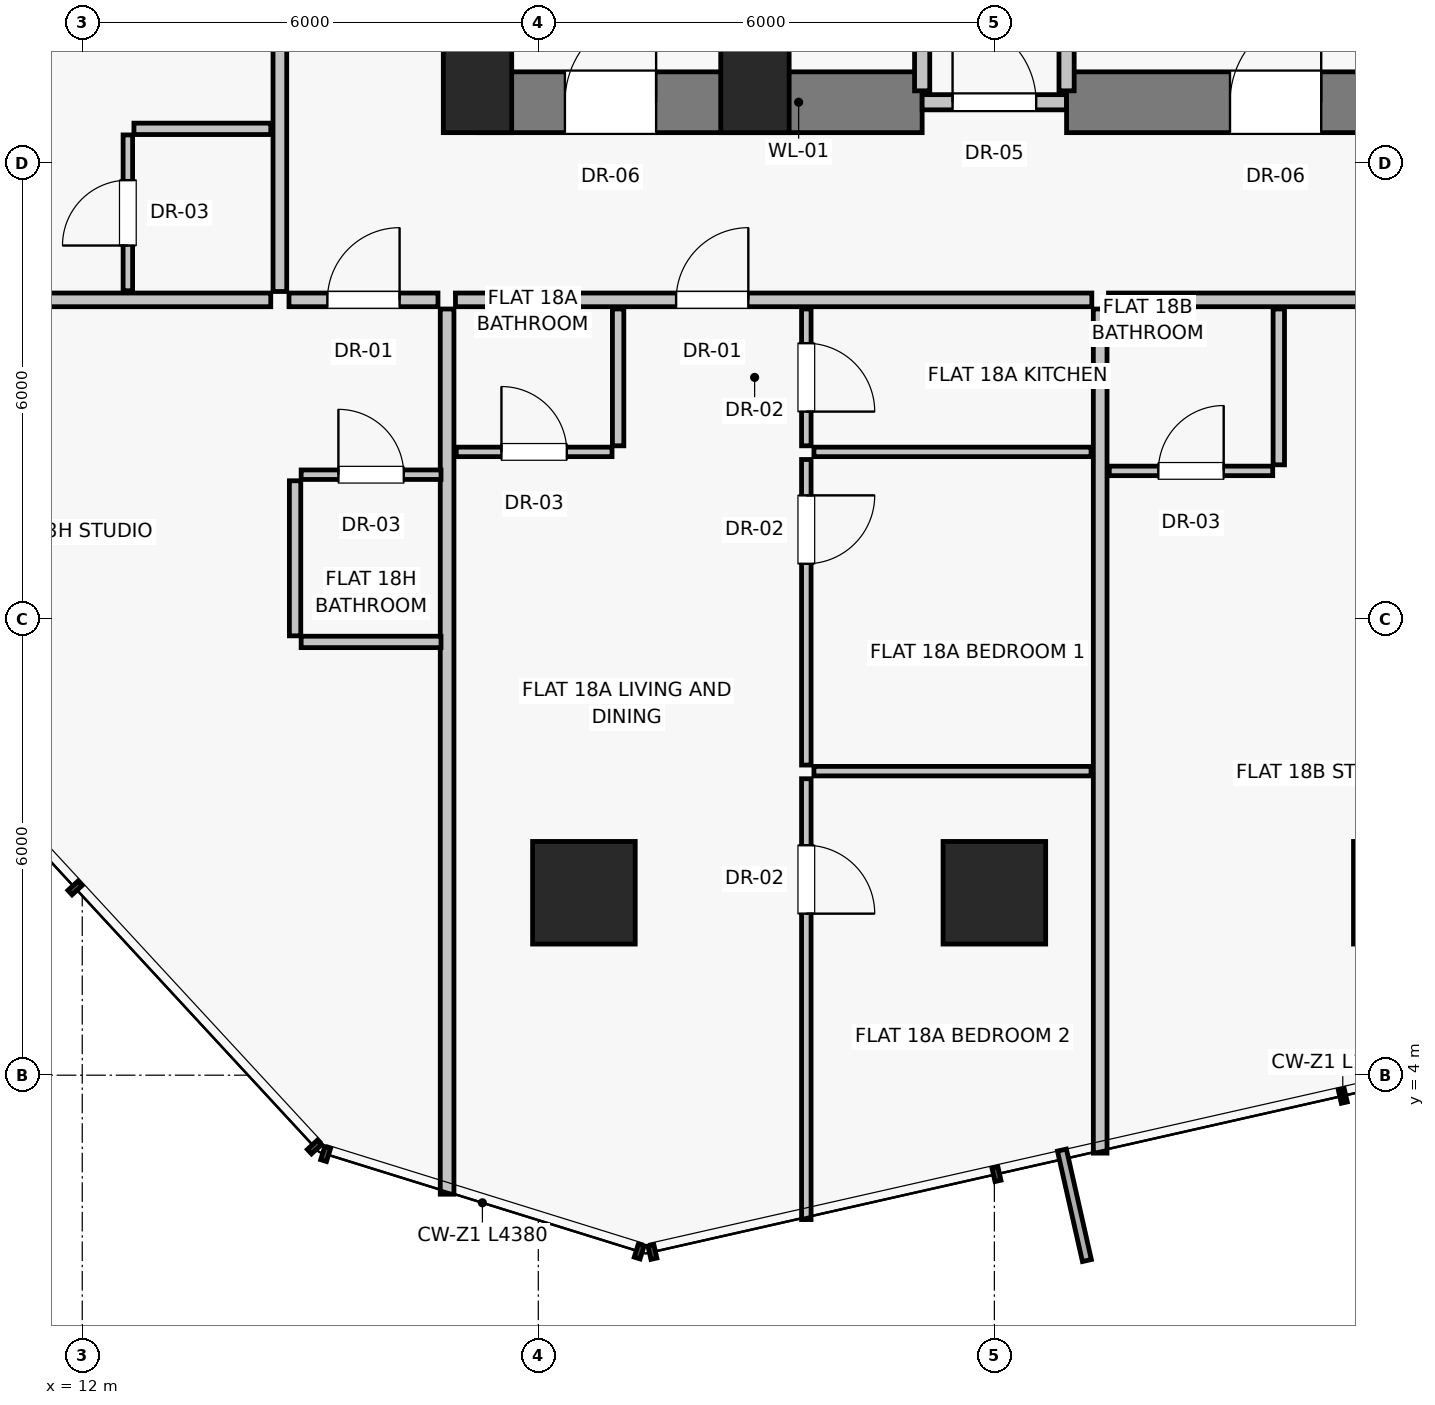
"""IFC4 building model, lengths in metres.
Left out: names, types, materials, properties, quantities, classifications, styles, units other than length and angle.
Written with IfcOpenShell. Run it as: python <this file> out.ifc"""

import sys

from ifc_helpers import new_model, si_unit, direction, frame, frame_2d, origin, origin_2d, place, context, subcontext, project, spatial, rectangle, extrude, source, transform, mapped, element, fill, save


model = new_model("IFC4")
c1 = context("Model", 3, precision=1e-05, world=origin(), true_north=direction((0.0, 1.0)))
c2 = subcontext(c1, "Body", "Model", "MODEL_VIEW")
j1 = project(units=[si_unit("LENGTHUNIT", "METRE"), si_unit("PLANEANGLEUNIT", "RADIAN")], contexts=[c1])
p1 = place(None, origin())
s1 = spatial("IfcSite", under=j1, at=p1, CompositionType="ELEMENT")
p2 = place(p1, origin())
s2 = spatial("IfcBuilding", under=s1, at=p2, CompositionType="ELEMENT")
p3 = place(p2, frame((0.0, 0.0, 67.35)))
s3 = spatial("IfcBuildingStorey", under=s2, at=p3, CompositionType="ELEMENT", Elevation=67.35)
for number, where, z_axis, x_axis in (
    (1, (17.2, 17.0, 0.0), (0.0, 0.0, 1.0), (1.0, 0.0, 0.0)),
    (2, (20.85, 17.0, 0.0), (0.0, 0.0, 1.0), (1.0, 0.0, 0.0)),
):
    element("IfcColumn", number, at=place(p3, frame(where, z_axis=z_axis, x_axis=x_axis)), inside=s3, PredefinedType="PILASTER", context=c2, shape_type="SweptSolid", body=[
        extrude(rectangle(XDim=0.9, YDim=1.2, at=origin_2d()), origin(), (0.0, 0.0, 1.0), 3.25),
    ])
for number, where, z_axis, x_axis in (
    (3, (18.6, 6.4, 0.0), (0.0, 0.0, 1.0), (1.0, 0.0, 0.0)),
    (4, (24.0, 6.4, 0.0), (0.0, 0.0, 1.0), (1.0, 0.0, 0.0)),
    (5, (29.4, 6.4, 0.0), (0.0, 0.0, 1.0), (1.0, 0.0, 0.0)),
):
    element("IfcColumn", number, at=place(p3, frame(where, z_axis=z_axis, x_axis=x_axis)), inside=s3, PredefinedType="COLUMN", context=c2, shape_type="SweptSolid", body=[
        extrude(rectangle(XDim=1.35, YDim=1.35, at=origin_2d()), origin(), (0.0, 0.0, 1.0), 3.25),
    ])
p4 = place(p3, frame((17.2, 16.8, 0.0), z_axis=(0.0, 0.0, 1.0), x_axis=(0.0, 1.0, 0.0)))
e6 = element("IfcWall", 6, at=p4, inside=s3, PredefinedType="SHEAR", context=c2, shape_type="SweptSolid", body=[
    extrude(rectangle(XDim=14.2, YDim=0.8, at=frame_2d((7.1, 0.0))), origin(), (0.0, 0.0, 1.0), 3.0),
])
p5 = place(p3, frame((17.2, 16.8, 0.0), z_axis=(0.0, 0.0, 1.0), x_axis=(1.0, 0.0, 0.0)))
e7 = element("IfcWall", 7, at=p5, inside=s3, PredefinedType="SHEAR", context=c2, shape_type="SweptSolid", body=[
    extrude(rectangle(XDim=5.85, YDim=0.8, at=frame_2d((2.925, 0.0))), origin(), (0.0, 0.0, 1.0), 3.0),
])
p6 = place(p5, frame((1.15, 0.0, 0.0)))
e8 = element("IfcOpeningElement", 8, at=p6, cuts=e7, PredefinedType="OPENING", context=c2, shape_type="SweptSolid", body=[
    extrude(rectangle(XDim=1.2, YDim=2.03, at=frame_2d((0.6, 1.015))), frame((0.0, 0.41, 0.0), z_axis=(0.0, -1.0, 0.0), x_axis=(1.0, 0.0, 0.0)), (0.0, 0.0, 1.0), 0.82),
])
p7 = place(p3, frame((23.05, 16.8, 0.0), z_axis=(0.0, 0.0, 1.0), x_axis=(1.0, 0.0, 0.0)))
e9 = element("IfcWall", 9, at=p7, inside=s3, PredefinedType="SOLIDWALL", context=c2, shape_type="SweptSolid", body=[
    extrude(rectangle(XDim=1.9, YDim=0.2, at=frame_2d((0.95, 0.0))), origin(), (0.0, 0.0, 1.0), 2.15),
])
p8 = place(p7, frame((0.4, 0.0, 0.0)))
e10 = element("IfcOpeningElement", 10, at=p8, cuts=e9, PredefinedType="OPENING", context=c2, shape_type="SweptSolid", body=[
    extrude(rectangle(XDim=1.1, YDim=2.03, at=frame_2d((0.55, 1.015))), frame((0.0, 0.11, 0.0), z_axis=(0.0, -1.0, 0.0), x_axis=(1.0, 0.0, 0.0)), (0.0, 0.0, 1.0), 0.22),
])
p9 = place(p3, frame((24.95, 16.8, 0.0), z_axis=(0.0, 0.0, 1.0), x_axis=(1.0, 0.0, 0.0)))
e11 = element("IfcWall", 11, at=p9, inside=s3, PredefinedType="SHEAR", context=c2, shape_type="SweptSolid", body=[
    extrude(rectangle(XDim=5.85, YDim=0.8, at=frame_2d((2.925, 0.0))), origin(), (0.0, 0.0, 1.0), 3.0),
])
p10 = place(p9, frame((2.15, 0.0, 0.0)))
e12 = element("IfcOpeningElement", 12, at=p10, cuts=e11, PredefinedType="OPENING", context=c2, shape_type="SweptSolid", body=[
    extrude(rectangle(XDim=1.2, YDim=2.03, at=frame_2d((0.6, 1.015))), frame((0.0, 0.41, 0.0), z_axis=(0.0, -1.0, 0.0), x_axis=(1.0, 0.0, 0.0)), (0.0, 0.0, 1.0), 0.82),
])
for number, where, z_axis, x_axis in (
    (13, (23.05, 16.95, 0.0), (0.0, 0.0, 1.0), (0.0, 1.0, 0.0)),
    (14, (24.95, 16.95, 0.0), (0.0, 0.0, 1.0), (0.0, 1.0, 0.0)),
):
    element("IfcWall", number, at=place(p3, frame(where, z_axis=z_axis, x_axis=x_axis)), inside=s3, PredefinedType="SOLIDWALL", context=c2, shape_type="SweptSolid", body=[
        extrude(rectangle(XDim=5.6, YDim=0.2, at=frame_2d((2.8, 0.0))), origin(), (0.0, 0.0, 1.0), 3.0),
    ])
p11 = place(p3, frame((16.8, 14.08, 0.0), z_axis=(0.0, 0.0, 1.0), x_axis=(0.0, -1.0, 0.0)))
e15 = element("IfcWall", 15, at=p11, inside=s3, PredefinedType="PARTITIONING", context=c2, shape_type="SweptSolid", body=[
    extrude(rectangle(XDim=11.646, YDim=0.18, at=frame_2d((5.823, 0.0))), origin(), (0.0, 0.0, 1.0), 3.0),
])
p12 = place(p3, frame((16.91, 14.2, 0.0), z_axis=(0.0, 0.0, 1.0), x_axis=(1.0, 0.0, 0.0)))
e16 = element("IfcWall", 16, at=p12, inside=s3, PredefinedType="PARTITIONING", context=c2, shape_type="SweptSolid", body=[
    extrude(rectangle(XDim=8.372, YDim=0.18, at=frame_2d((4.186, 0.0))), origin(), (0.0, 0.0, 1.0), 3.0),
])
p13 = place(p12, frame((2.903, 0.0, 0.0)))
e17 = element("IfcOpeningElement", 17, at=p13, cuts=e16, PredefinedType="OPENING", context=c2, shape_type="SweptSolid", body=[
    extrude(rectangle(XDim=0.95, YDim=2.02, at=frame_2d((0.475, 1.01))), frame((0.0, 0.1, 0.0), z_axis=(0.0, -1.0, 0.0), x_axis=(1.0, 0.0, 0.0)), (0.0, 0.0, 1.0), 0.2),
])
p14 = place(p3, frame((19.05, 14.08, 0.0), z_axis=(0.0, 0.0, 1.0), x_axis=(0.0, -1.0, 0.0)))
e18 = element("IfcWall", 18, at=p14, inside=s3, PredefinedType="PARTITIONING", context=c2, shape_type="SweptSolid", body=[
    extrude(rectangle(XDim=1.8, YDim=0.15, at=frame_2d((0.9, 0.0))), origin(), (0.0, 0.0, 1.0), 3.0),
])
p15 = place(p3, frame((16.92, 12.2, 0.0), z_axis=(0.0, 0.0, 1.0), x_axis=(1.0, 0.0, 0.0)))
e19 = element("IfcWall", 19, at=p15, inside=s3, PredefinedType="PARTITIONING", context=c2, shape_type="SweptSolid", body=[
    extrude(rectangle(XDim=2.05, YDim=0.125, at=frame_2d((1.025, 0.0))), origin(), (0.0, 0.0, 1.0), 3.0),
])
p16 = place(p15, frame((0.595, 0.0, 0.0)))
e20 = element("IfcOpeningElement", 20, at=p16, cuts=e19, PredefinedType="OPENING", context=c2, shape_type="SweptSolid", body=[
    extrude(rectangle(XDim=0.86, YDim=2.01, at=frame_2d((0.43, 1.005))), frame((0.0, 0.073, 0.0), z_axis=(0.0, -1.0, 0.0), x_axis=(1.0, 0.0, 0.0)), (0.0, 0.0, 1.0), 0.145),
])
p17 = place(p3, frame((21.526, 14.08, 0.0), z_axis=(0.0, 0.0, 1.0), x_axis=(0.0, -1.0, 0.0)))
e21 = element("IfcWall", 21, at=p17, inside=s3, PredefinedType="PARTITIONING", context=c2, shape_type="SweptSolid", body=[
    extrude(rectangle(XDim=1.8, YDim=0.125, at=frame_2d((0.9, 0.0))), origin(), (0.0, 0.0, 1.0), 3.0),
])
p18 = place(p17, frame((0.45, 0.0, 0.0)))
e22 = element("IfcOpeningElement", 22, at=p18, cuts=e21, PredefinedType="OPENING", context=c2, shape_type="SweptSolid", body=[
    extrude(rectangle(XDim=0.9, YDim=2.01, at=frame_2d((0.45, 1.005))), frame((0.0, 0.073, 0.0), z_axis=(0.0, -1.0, 0.0), x_axis=(1.0, 0.0, 0.0)), (0.0, 0.0, 1.0), 0.145),
])
for number, where, z_axis, x_axis in (
    (23, (21.626, 12.2, 0.0), (0.0, 0.0, 1.0), (1.0, 0.0, 0.0)),
    (24, (21.626, 8.0, 0.0), (0.0, 0.0, 1.0), (1.0, 0.0, 0.0)),
):
    element("IfcWall", number, at=place(p3, frame(where, z_axis=z_axis, x_axis=x_axis)), inside=s3, PredefinedType="PARTITIONING", context=c2, shape_type="SweptSolid", body=[
        extrude(rectangle(XDim=3.646, YDim=0.125, at=frame_2d((1.823, 0.0))), origin(), (0.0, 0.0, 1.0), 3.0),
    ])
p19 = place(p3, frame((21.526, 12.1, 0.0), z_axis=(0.0, 0.0, 1.0), x_axis=(0.0, -1.0, 0.0)))
e25 = element("IfcWall", 25, at=p19, inside=s3, PredefinedType="PARTITIONING", context=c2, shape_type="SweptSolid", body=[
    extrude(rectangle(XDim=4.02, YDim=0.125, at=frame_2d((2.01, 0.0))), origin(), (0.0, 0.0, 1.0), 3.0),
])
p20 = place(p19, frame((0.472, 0.0, 0.0)))
e26 = element("IfcOpeningElement", 26, at=p20, cuts=e25, PredefinedType="OPENING", context=c2, shape_type="SweptSolid", body=[
    extrude(rectangle(XDim=0.9, YDim=2.01, at=frame_2d((0.45, 1.005))), frame((0.0, 0.073, 0.0), z_axis=(0.0, -1.0, 0.0), x_axis=(1.0, 0.0, 0.0)), (0.0, 0.0, 1.0), 0.145),
])
p21 = place(p3, frame((21.526, 7.9, 0.0), z_axis=(0.0, 0.0, 1.0), x_axis=(0.0, -1.0, 0.0)))
e27 = element("IfcWall", 27, at=p21, inside=s3, PredefinedType="PARTITIONING", context=c2, shape_type="SweptSolid", body=[
    extrude(rectangle(XDim=5.799, YDim=0.125, at=frame_2d((2.9, 0.0))), origin(), (0.0, 0.0, 1.0), 3.0),
])
p22 = place(p21, frame((0.875, 0.0, 0.0)))
e28 = element("IfcOpeningElement", 28, at=p22, cuts=e27, PredefinedType="OPENING", context=c2, shape_type="SweptSolid", body=[
    extrude(rectangle(XDim=0.9, YDim=2.01, at=frame_2d((0.45, 1.005))), frame((0.0, 0.073, 0.0), z_axis=(0.0, -1.0, 0.0), x_axis=(1.0, 0.0, 0.0)), (0.0, 0.0, 1.0), 0.145),
])
p23 = place(p3, frame((25.392, 14.08, 0.0), z_axis=(0.0, 0.0, 1.0), x_axis=(0.0, -1.0, 0.0)))
e29 = element("IfcWall", 29, at=p23, inside=s3, PredefinedType="PARTITIONING", context=c2, shape_type="SweptSolid", body=[
    extrude(rectangle(XDim=11.105, YDim=0.18, at=frame_2d((5.553, 0.0))), origin(), (0.0, 0.0, 1.0), 3.0),
])
p24 = place(p3, frame((25.502, 14.2, 0.0), z_axis=(0.0, 0.0, 1.0), x_axis=(1.0, 0.0, 0.0)))
e30 = element("IfcWall", 30, at=p24, inside=s3, PredefinedType="PARTITIONING", context=c2, shape_type="SweptSolid", body=[
    extrude(rectangle(XDim=5.588, YDim=0.18, at=frame_2d((2.794, 0.0))), origin(), (0.0, 0.0, 1.0), 3.0),
])
p25 = place(p24, frame((3.336, 0.0, 0.0)))
e31 = element("IfcOpeningElement", 31, at=p25, cuts=e30, PredefinedType="OPENING", context=c2, shape_type="SweptSolid", body=[
    extrude(rectangle(XDim=0.95, YDim=2.02, at=frame_2d((0.475, 1.01))), frame((0.0, 0.1, 0.0), z_axis=(0.0, -1.0, 0.0), x_axis=(1.0, 0.0, 0.0)), (0.0, 0.0, 1.0), 0.2),
])
p26 = place(p3, frame((27.742, 14.08, 0.0), z_axis=(0.0, 0.0, 1.0), x_axis=(0.0, -1.0, 0.0)))
e32 = element("IfcWall", 32, at=p26, inside=s3, PredefinedType="PARTITIONING", context=c2, shape_type="SweptSolid", body=[
    extrude(rectangle(XDim=2.05, YDim=0.15, at=frame_2d((1.025, 0.0))), origin(), (0.0, 0.0, 1.0), 3.0),
])
p27 = place(p3, frame((25.512, 11.95, 0.0), z_axis=(0.0, 0.0, 1.0), x_axis=(1.0, 0.0, 0.0)))
e33 = element("IfcWall", 33, at=p27, inside=s3, PredefinedType="PARTITIONING", context=c2, shape_type="SweptSolid", body=[
    extrude(rectangle(XDim=2.15, YDim=0.125, at=frame_2d((1.075, 0.0))), origin(), (0.0, 0.0, 1.0), 2.58),
])
p28 = place(p27, frame((0.645, 0.0, 0.0)))
e34 = element("IfcOpeningElement", 34, at=p28, cuts=e33, PredefinedType="OPENING", context=c2, shape_type="SweptSolid", body=[
    extrude(rectangle(XDim=0.86, YDim=2.01, at=frame_2d((0.43, 1.005))), frame((0.0, 0.073, 0.0), z_axis=(0.0, -1.0, 0.0), x_axis=(1.0, 0.0, 0.0)), (0.0, 0.0, 1.0), 0.145),
])
p29 = place(p3, frame((14.48, 14.2, 0.0), z_axis=(0.0, 0.0, 1.0), x_axis=(-1.0, 0.0, 0.0)))
e35 = element("IfcWall", 35, at=p29, inside=s3, PredefinedType="PARTITIONING", context=c2, shape_type="SweptSolid", body=[
    extrude(rectangle(XDim=9.765, YDim=0.18, at=frame_2d((4.882, 0.0))), origin(), (0.0, 0.0, 1.0), 3.0),
])
p30 = place(p3, frame((14.6, 14.31, 0.0), z_axis=(0.0, 0.0, 1.0), x_axis=(0.0, 1.0, 0.0)))
e36 = element("IfcWall", 36, at=p30, inside=s3, PredefinedType="PARTITIONING", context=c2, shape_type="SweptSolid", body=[
    extrude(rectangle(XDim=11.438, YDim=0.18, at=frame_2d((5.719, 0.0))), origin(), (0.0, 0.0, 1.0), 3.0),
])
p31 = place(p30, frame((3.804, 0.0, 0.0)))
e37 = element("IfcOpeningElement", 37, at=p31, cuts=e36, PredefinedType="OPENING", context=c2, shape_type="SweptSolid", body=[
    extrude(rectangle(XDim=0.95, YDim=2.02, at=frame_2d((0.475, 1.01))), frame((0.0, 0.1, 0.0), z_axis=(0.0, -1.0, 0.0), x_axis=(1.0, 0.0, 0.0)), (0.0, 0.0, 1.0), 0.2),
])
p32 = place(p3, frame((14.48, 16.45, 0.0), z_axis=(0.0, 0.0, 1.0), x_axis=(-1.0, 0.0, 0.0)))
e38 = element("IfcWall", 38, at=p32, inside=s3, PredefinedType="PARTITIONING", context=c2, shape_type="SweptSolid", body=[
    extrude(rectangle(XDim=1.8, YDim=0.15, at=frame_2d((0.9, 0.0))), origin(), (0.0, 0.0, 1.0), 3.0),
])
p33 = place(p3, frame((12.6, 14.32, 0.0), z_axis=(0.0, 0.0, 1.0), x_axis=(0.0, 1.0, 0.0)))
e39 = element("IfcWall", 39, at=p33, inside=s3, PredefinedType="PARTITIONING", context=c2, shape_type="SweptSolid", body=[
    extrude(rectangle(XDim=2.05, YDim=0.125, at=frame_2d((1.025, 0.0))), origin(), (0.0, 0.0, 1.0), 3.0),
])
p34 = place(p33, frame((0.595, 0.0, 0.0)))
e40 = element("IfcOpeningElement", 40, at=p34, cuts=e39, PredefinedType="OPENING", context=c2, shape_type="SweptSolid", body=[
    extrude(rectangle(XDim=0.86, YDim=2.01, at=frame_2d((0.43, 1.005))), frame((0.0, 0.073, 0.0), z_axis=(0.0, -1.0, 0.0), x_axis=(1.0, 0.0, 0.0)), (0.0, 0.0, 1.0), 0.145),
])
p35 = place(p3, frame((14.72, 14.2, 0.0), z_axis=(0.0, 0.0, 1.0), x_axis=(1.0, 0.0, 0.0)))
e41 = element("IfcWall", 41, at=p35, inside=s3, PredefinedType="PARTITIONING", context=c2, shape_type="SweptSolid", body=[
    extrude(rectangle(XDim=1.96, YDim=0.18, at=frame_2d((0.98, 0.0))), origin(), (0.0, 0.0, 1.0), 3.0),
])
p36 = place(p35, frame((0.505, 0.0, 0.0)))
e42 = element("IfcOpeningElement", 42, at=p36, cuts=e41, PredefinedType="OPENING", context=c2, shape_type="SweptSolid", body=[
    extrude(rectangle(XDim=0.95, YDim=2.02, at=frame_2d((0.475, 1.01))), frame((0.0, 0.1, 0.0), z_axis=(0.0, -1.0, 0.0), x_axis=(1.0, 0.0, 0.0)), (0.0, 0.0, 1.0), 0.2),
])
p37 = place(p3, frame((14.88, 11.9, 0.0), z_axis=(0.0, 0.0, 1.0), x_axis=(1.0, 0.0, 0.0)))
e43 = element("IfcWall", 43, at=p37, inside=s3, PredefinedType="PARTITIONING", context=c2, shape_type="SweptSolid", body=[
    extrude(rectangle(XDim=1.84, YDim=0.125, at=frame_2d((0.92, 0.0))), origin(), (0.0, 0.0, 1.0), 3.0),
])
p38 = place(p37, frame((0.49, 0.0, 0.0)))
e44 = element("IfcOpeningElement", 44, at=p38, cuts=e43, PredefinedType="OPENING", context=c2, shape_type="SweptSolid", body=[
    extrude(rectangle(XDim=0.86, YDim=2.01, at=frame_2d((0.43, 1.005))), frame((0.0, 0.073, 0.0), z_axis=(0.0, -1.0, 0.0), x_axis=(1.0, 0.0, 0.0)), (0.0, 0.0, 1.0), 0.145),
])
p39 = place(p3, frame((14.88, 9.7, 0.0), z_axis=(0.0, 0.0, 1.0), x_axis=(1.0, 0.0, 0.0)))
e45 = element("IfcWall", 45, at=p39, inside=s3, PredefinedType="PARTITIONING", context=c2, shape_type="SweptSolid", body=[
    extrude(rectangle(XDim=1.84, YDim=0.15, at=frame_2d((0.92, 0.0))), origin(), (0.0, 0.0, 1.0), 3.0),
])
p40 = place(p3, frame((14.8, 9.78, 0.0), z_axis=(0.0, 0.0, 1.0), x_axis=(0.0, 1.0, 0.0)))
e46 = element("IfcWall", 46, at=p40, inside=s3, PredefinedType="PARTITIONING", context=c2, shape_type="SweptSolid", body=[
    extrude(rectangle(XDim=2.04, YDim=0.15, at=frame_2d((1.02, 0.0))), origin(), (0.0, 0.0, 1.0), 3.0),
])
m1 = source(origin(), c2, "Body", "SweptSolid", [
    extrude(rectangle(XDim=1.2, YDim=2.03, at=frame_2d((0.6, 1.015))), frame((0.0, 0.025, 0.0), z_axis=(0.0, -1.0, 0.0), x_axis=(1.0, 0.0, 0.0)), (0.0, 0.0, 1.0), 0.05),
])
p41 = place(p6, origin())
e47 = element("IfcDoor", 47, at=p41, inside=s3, OperationType="SINGLE_SWING_RIGHT", PredefinedType="DOOR", context=c2, shape_type="MappedRepresentation", body=[
    mapped(m1, transform((0.0, 0.0, 0.0), scale=1.0)),
])
fill(e8, e47)
m2 = source(origin(), c2, "Body", "SweptSolid", [
    extrude(rectangle(XDim=1.1, YDim=2.03, at=frame_2d((0.55, 1.015))), frame((0.0, 0.025, 0.0), z_axis=(0.0, -1.0, 0.0), x_axis=(1.0, 0.0, 0.0)), (0.0, 0.0, 1.0), 0.05),
])
p42 = place(p8, origin())
e48 = element("IfcDoor", 48, at=p42, inside=s3, OperationType="SINGLE_SWING_LEFT", PredefinedType="DOOR", context=c2, shape_type="MappedRepresentation", body=[
    mapped(m2, transform((0.0, 0.0, 0.0), scale=1.0)),
])
fill(e10, e48)
p43 = place(p10, origin())
e49 = element("IfcDoor", 49, at=p43, inside=s3, OperationType="SINGLE_SWING_RIGHT", PredefinedType="DOOR", context=c2, shape_type="MappedRepresentation", body=[
    mapped(m1, transform((0.0, 0.0, 0.0), scale=1.0)),
])
fill(e12, e49)
m3 = source(origin(), c2, "Body", "SweptSolid", [
    extrude(rectangle(XDim=0.95, YDim=2.02, at=frame_2d((0.475, 1.01))), frame((0.0, 0.025, 0.0), z_axis=(0.0, -1.0, 0.0), x_axis=(1.0, 0.0, 0.0)), (0.0, 0.0, 1.0), 0.05),
])
p44 = place(p13, origin())
e50 = element("IfcDoor", 50, at=p44, inside=s3, OperationType="SINGLE_SWING_RIGHT", PredefinedType="DOOR", context=c2, shape_type="MappedRepresentation", body=[
    mapped(m3, transform((0.0, 0.0, 0.0), scale=1.0)),
])
fill(e17, e50)
m4 = source(origin(), c2, "Body", "SweptSolid", [
    extrude(rectangle(XDim=0.86, YDim=2.01, at=frame_2d((0.43, 1.005))), frame((0.0, 0.025, 0.0), z_axis=(0.0, -1.0, 0.0), x_axis=(1.0, 0.0, 0.0)), (0.0, 0.0, 1.0), 0.05),
])
p45 = place(p16, origin())
e51 = element("IfcDoor", 51, at=p45, inside=s3, OperationType="SINGLE_SWING_LEFT", PredefinedType="DOOR", context=c2, shape_type="MappedRepresentation", body=[
    mapped(m4, transform((0.0, 0.0, 0.0), scale=1.0)),
])
fill(e20, e51)
m5 = source(origin(), c2, "Body", "SweptSolid", [
    extrude(rectangle(XDim=0.9, YDim=2.01, at=frame_2d((0.45, 1.005))), frame((0.0, 0.025, 0.0), z_axis=(0.0, -1.0, 0.0), x_axis=(1.0, 0.0, 0.0)), (0.0, 0.0, 1.0), 0.05),
])
p46 = place(p18, origin())
e52 = element("IfcDoor", 52, at=p46, inside=s3, OperationType="SINGLE_SWING_RIGHT", PredefinedType="DOOR", context=c2, shape_type="MappedRepresentation", body=[
    mapped(m5, transform((0.0, 0.0, 0.0), scale=1.0)),
])
fill(e22, e52)
p47 = place(p20, origin())
e53 = element("IfcDoor", 53, at=p47, inside=s3, OperationType="SINGLE_SWING_LEFT", PredefinedType="DOOR", context=c2, shape_type="MappedRepresentation", body=[
    mapped(m5, transform((0.0, 0.0, 0.0), scale=1.0)),
])
fill(e26, e53)
p48 = place(p22, origin())
e54 = element("IfcDoor", 54, at=p48, inside=s3, OperationType="SINGLE_SWING_RIGHT", PredefinedType="DOOR", context=c2, shape_type="MappedRepresentation", body=[
    mapped(m5, transform((0.0, 0.0, 0.0), scale=1.0)),
])
fill(e28, e54)
p49 = place(p28, origin())
e55 = element("IfcDoor", 55, at=p49, inside=s3, OperationType="SINGLE_SWING_RIGHT", PredefinedType="DOOR", context=c2, shape_type="MappedRepresentation", body=[
    mapped(m4, transform((0.0, 0.0, 0.0), scale=1.0)),
])
fill(e34, e55)
p50 = place(p34, origin())
e56 = element("IfcDoor", 56, at=p50, inside=s3, OperationType="SINGLE_SWING_LEFT", PredefinedType="DOOR", context=c2, shape_type="MappedRepresentation", body=[
    mapped(m4, transform((0.0, 0.0, 0.0), scale=1.0)),
])
fill(e40, e56)
p51 = place(p36, origin())
e57 = element("IfcDoor", 57, at=p51, inside=s3, OperationType="SINGLE_SWING_RIGHT", PredefinedType="DOOR", context=c2, shape_type="MappedRepresentation", body=[
    mapped(m3, transform((0.0, 0.0, 0.0), scale=1.0)),
])
fill(e42, e57)
p52 = place(p38, origin())
e58 = element("IfcDoor", 58, at=p52, inside=s3, OperationType="SINGLE_SWING_LEFT", PredefinedType="DOOR", context=c2, shape_type="MappedRepresentation", body=[
    mapped(m4, transform((0.0, 0.0, 0.0), scale=1.0)),
])
fill(e44, e58)
save(model, sys.argv[1])
